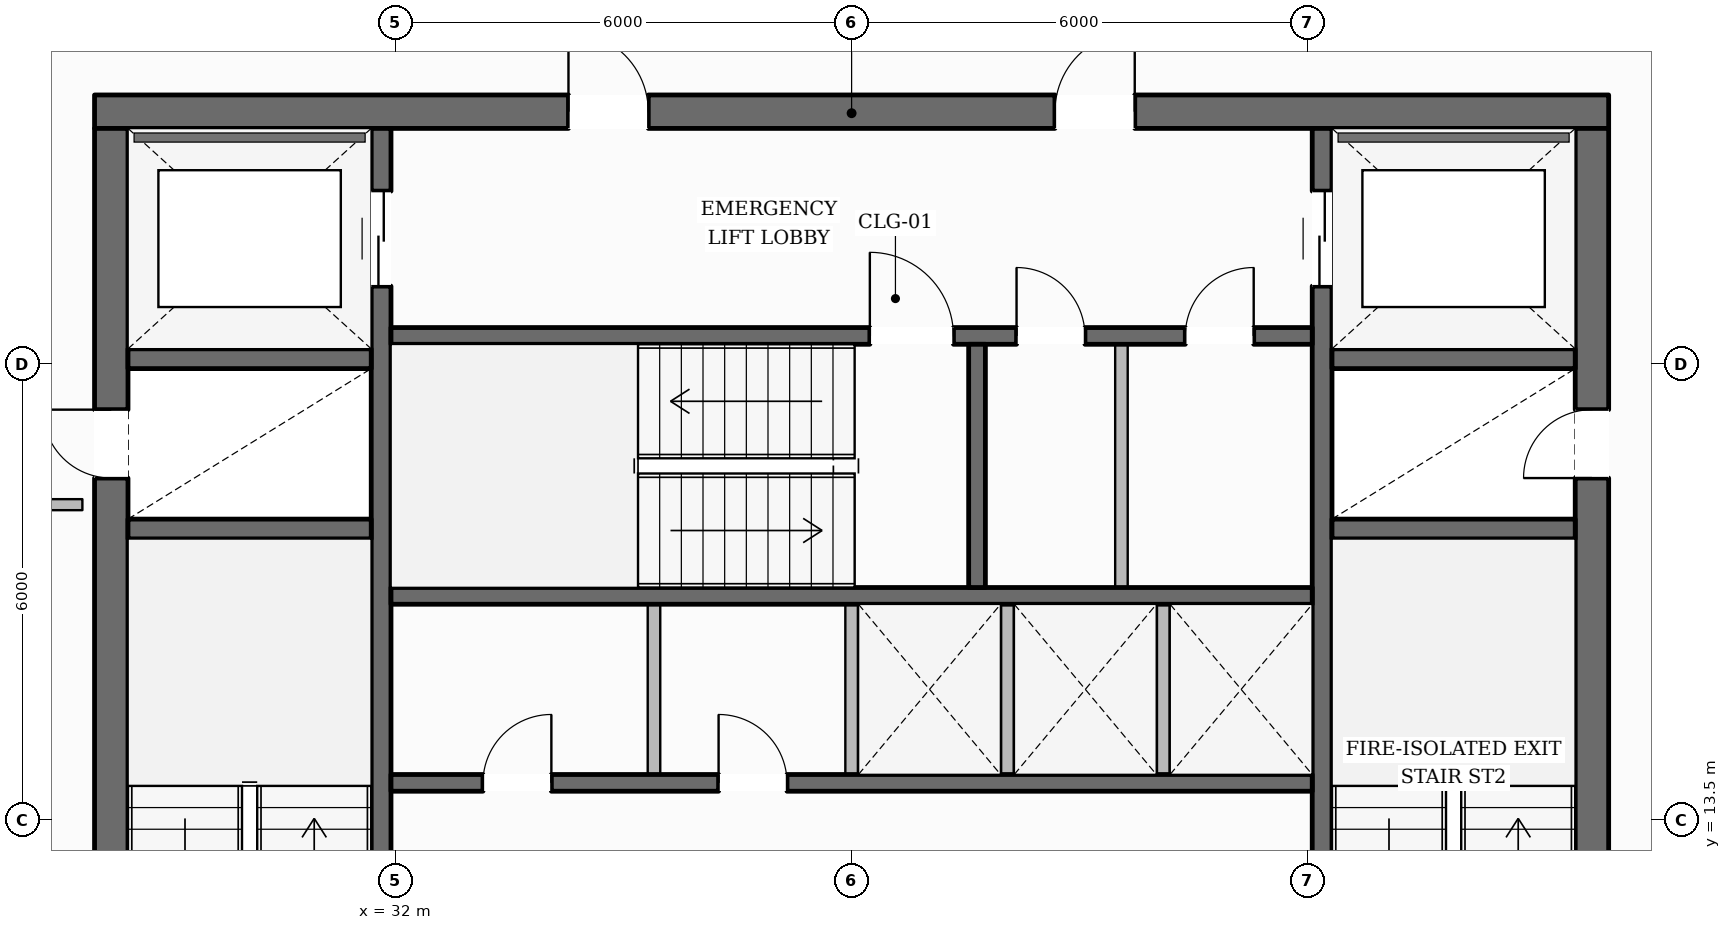
"""IFC4 building model, lengths in metres.
Left out: names, types, materials, properties, quantities, classifications, styles, units other than length and angle.
Written with IfcOpenShell. Run it as: python <this file> out.ifc"""

import sys

from ifc_helpers import new_model, si_unit, direction, frame, frame_2d, origin, place, context, subcontext, project, spatial, rectangle, extrude, element, fill, save


model = new_model("IFC4")
c1 = context("Model", 3, precision=1e-05, world=origin(), true_north=direction((0.0, 1.0)))
c2 = subcontext(c1, "Body", "Model", "MODEL_VIEW")
j1 = project(units=[si_unit("LENGTHUNIT", "METRE"), si_unit("PLANEANGLEUNIT", "RADIAN")], contexts=[c1])
p1 = place(None, origin())
s1 = spatial("IfcSite", under=j1, at=p1, CompositionType="ELEMENT")
p2 = place(p1, origin())
s2 = spatial("IfcBuilding", under=s1, at=p2, CompositionType="ELEMENT")
p3 = place(p2, frame((0.0, 0.0, 165.0)))
s3 = spatial("IfcBuildingStorey", under=s2, at=p3, CompositionType="ELEMENT", Elevation=165.0)
p4 = place(p3, frame((28.04, 22.82, 0.0), z_axis=(0.0, 0.0, 1.0), x_axis=(1.0, 0.0, 0.0)))
e1 = element("IfcWall", 1, at=p4, inside=s3, PredefinedType="SOLIDWALL", context=c2, shape_type="SweptSolid", body=[
    extrude(rectangle(XDim=19.92, YDim=0.44, at=frame_2d((9.96, 0.0))), origin(), (0.0, 0.0, 1.0), 3.6),
])
p5 = place(p4, frame((6.235, 0.0, 0.0)))
e2 = element("IfcOpeningElement", 2, at=p5, cuts=e1, PredefinedType="OPENING", context=c2, shape_type="SweptSolid", body=[
    extrude(rectangle(XDim=1.05, YDim=2.15, at=frame_2d((0.525, 1.075))), frame((0.0, 0.23, 0.0), z_axis=(0.0, -1.0, 0.0), x_axis=(1.0, 0.0, 0.0)), (0.0, 0.0, 1.0), 0.46),
])
p6 = place(p4, frame((12.635, 0.0, 0.0)))
e3 = element("IfcOpeningElement", 3, at=p6, cuts=e1, PredefinedType="OPENING", context=c2, shape_type="SweptSolid", body=[
    extrude(rectangle(XDim=1.05, YDim=2.15, at=frame_2d((0.525, 1.075))), frame((0.0, 0.23, 0.0), z_axis=(0.0, -1.0, 0.0), x_axis=(1.0, 0.0, 0.0)), (0.0, 0.0, 1.0), 0.46),
])
p7 = place(p3, frame((28.26, 9.6, 0.0), z_axis=(0.0, 0.0, 1.0), x_axis=(0.0, 1.0, 0.0)))
e4 = element("IfcWall", 4, at=p7, inside=s3, PredefinedType="SOLIDWALL", context=c2, shape_type="SweptSolid", body=[
    extrude(rectangle(XDim=13.0, YDim=0.44, at=frame_2d((6.5, 0.0))), origin(), (0.0, 0.0, 1.0), 3.6),
])
p8 = place(p7, frame((0.2, 0.0, 0.0)))
e5 = element("IfcOpeningElement", 5, at=p8, cuts=e4, PredefinedType="OPENING", context=c2, shape_type="SweptSolid", body=[
    extrude(rectangle(XDim=1.1, YDim=2.15, at=frame_2d((0.55, 1.075))), frame((0.0, 0.23, 0.0), z_axis=(0.0, -1.0, 0.0), x_axis=(1.0, 0.0, 0.0)), (0.0, 0.0, 1.0), 0.46),
])
p9 = place(p7, frame((8.4, 0.0, 0.0)))
e6 = element("IfcOpeningElement", 6, at=p9, cuts=e4, PredefinedType="OPENING", context=c2, shape_type="SweptSolid", body=[
    extrude(rectangle(XDim=0.9, YDim=2.1, at=frame_2d((0.45, 1.05))), frame((0.0, 0.23, 0.0), z_axis=(0.0, -1.0, 0.0), x_axis=(1.0, 0.0, 0.0)), (0.0, 0.0, 1.0), 0.46),
])
p10 = place(p3, frame((47.74, 9.6, 0.0), z_axis=(0.0, 0.0, 1.0), x_axis=(0.0, 1.0, 0.0)))
e7 = element("IfcWall", 7, at=p10, inside=s3, PredefinedType="SOLIDWALL", context=c2, shape_type="SweptSolid", body=[
    extrude(rectangle(XDim=13.0, YDim=0.44, at=frame_2d((6.5, 0.0))), origin(), (0.0, 0.0, 1.0), 3.6),
])
p11 = place(p10, frame((0.2, 0.0, 0.0)))
e8 = element("IfcOpeningElement", 8, at=p11, cuts=e7, PredefinedType="OPENING", context=c2, shape_type="SweptSolid", body=[
    extrude(rectangle(XDim=1.1, YDim=2.15, at=frame_2d((0.55, 1.075))), frame((0.0, 0.23, 0.0), z_axis=(0.0, -1.0, 0.0), x_axis=(1.0, 0.0, 0.0)), (0.0, 0.0, 1.0), 0.46),
])
p12 = place(p10, frame((8.4, 0.0, 0.0)))
e9 = element("IfcOpeningElement", 9, at=p12, cuts=e7, PredefinedType="OPENING", context=c2, shape_type="SweptSolid", body=[
    extrude(rectangle(XDim=0.9, YDim=2.1, at=frame_2d((0.45, 1.05))), frame((0.0, 0.23, 0.0), z_axis=(0.0, -1.0, 0.0), x_axis=(1.0, 0.0, 0.0)), (0.0, 0.0, 1.0), 0.46),
])
p13 = place(p3, frame((31.81, 9.6, 0.0), z_axis=(0.0, 0.0, 1.0), x_axis=(0.0, 1.0, 0.0)))
e10 = element("IfcWall", 10, at=p13, inside=s3, PredefinedType="SHEAR", context=c2, shape_type="SweptSolid", body=[
    extrude(rectangle(XDim=13.0, YDim=0.26, at=frame_2d((6.5, 0.0))), origin(), (0.0, 0.0, 1.0), 3.6),
])
p14 = place(p13, frame((10.925, 0.0, 0.0)))
e11 = element("IfcOpeningElement", 11, at=p14, cuts=e10, PredefinedType="OPENING", context=c2, shape_type="SweptSolid", body=[
    extrude(rectangle(XDim=1.25, YDim=2.25, at=frame_2d((0.625, 1.125))), frame((0.0, 0.14, 0.0), z_axis=(0.0, -1.0, 0.0), x_axis=(1.0, 0.0, 0.0)), (0.0, 0.0, 1.0), 0.28),
])
p15 = place(p3, frame((44.19, 9.6, 0.0), z_axis=(0.0, 0.0, 1.0), x_axis=(0.0, 1.0, 0.0)))
e12 = element("IfcWall", 12, at=p15, inside=s3, PredefinedType="SHEAR", context=c2, shape_type="SweptSolid", body=[
    extrude(rectangle(XDim=13.0, YDim=0.26, at=frame_2d((6.5, 0.0))), origin(), (0.0, 0.0, 1.0), 3.6),
])
p16 = place(p15, frame((10.925, 0.0, 0.0)))
e13 = element("IfcOpeningElement", 13, at=p16, cuts=e12, PredefinedType="OPENING", context=c2, shape_type="SweptSolid", body=[
    extrude(rectangle(XDim=1.25, YDim=2.25, at=frame_2d((0.625, 1.125))), frame((0.0, 0.14, 0.0), z_axis=(0.0, -1.0, 0.0), x_axis=(1.0, 0.0, 0.0)), (0.0, 0.0, 1.0), 0.28),
])
for number, where, z_axis, x_axis in (
    (14, (28.48, 17.33, 0.0), (0.0, 0.0, 1.0), (1.0, 0.0, 0.0)),
    (15, (28.48, 19.57, 0.0), (0.0, 0.0, 1.0), (1.0, 0.0, 0.0)),
    (16, (44.32, 17.33, 0.0), (0.0, 0.0, 1.0), (1.0, 0.0, 0.0)),
    (17, (44.32, 19.57, 0.0), (0.0, 0.0, 1.0), (1.0, 0.0, 0.0)),
):
    element("IfcWall", number, at=place(p3, frame(where, z_axis=z_axis, x_axis=x_axis)), inside=s3, PredefinedType="SHEAR", context=c2, shape_type="SweptSolid", body=[
        extrude(rectangle(XDim=3.2, YDim=0.26, at=frame_2d((1.6, 0.0))), origin(), (0.0, 0.0, 1.0), 3.6),
    ])
p17 = place(p3, frame((31.94, 19.87, 0.0), z_axis=(0.0, 0.0, 1.0), x_axis=(1.0, 0.0, 0.0)))
e18 = element("IfcWall", 18, at=p17, inside=s3, PredefinedType="SOLIDWALL", context=c2, shape_type="SweptSolid", body=[
    extrude(rectangle(XDim=12.12, YDim=0.22, at=frame_2d((6.06, 0.0))), origin(), (0.0, 0.0, 1.0), 3.6),
])
p18 = place(p17, frame((6.3, 0.0, 0.0)))
e19 = element("IfcOpeningElement", 19, at=p18, cuts=e18, PredefinedType="OPENING", context=c2, shape_type="SweptSolid", body=[
    extrude(rectangle(XDim=1.1, YDim=2.15, at=frame_2d((0.55, 1.075))), frame((0.0, 0.12, 0.0), z_axis=(0.0, -1.0, 0.0), x_axis=(1.0, 0.0, 0.0)), (0.0, 0.0, 1.0), 0.24),
])
p19 = place(p17, frame((8.23, 0.0, 0.0)))
e20 = element("IfcOpeningElement", 20, at=p19, cuts=e18, PredefinedType="OPENING", context=c2, shape_type="SweptSolid", body=[
    extrude(rectangle(XDim=0.9, YDim=2.1, at=frame_2d((0.45, 1.05))), frame((0.0, 0.12, 0.0), z_axis=(0.0, -1.0, 0.0), x_axis=(1.0, 0.0, 0.0)), (0.0, 0.0, 1.0), 0.24),
])
p20 = place(p17, frame((10.45, 0.0, 0.0)))
e21 = element("IfcOpeningElement", 21, at=p20, cuts=e18, PredefinedType="OPENING", context=c2, shape_type="SweptSolid", body=[
    extrude(rectangle(XDim=0.9, YDim=2.1, at=frame_2d((0.45, 1.05))), frame((0.0, 0.12, 0.0), z_axis=(0.0, -1.0, 0.0), x_axis=(1.0, 0.0, 0.0)), (0.0, 0.0, 1.0), 0.24),
])
p21 = place(p3, frame((31.94, 16.45, 0.0), z_axis=(0.0, 0.0, 1.0), x_axis=(1.0, 0.0, 0.0)))
e22 = element("IfcWall", 22, at=p21, inside=s3, PredefinedType="SOLIDWALL", context=c2, shape_type="SweptSolid", body=[
    extrude(rectangle(XDim=12.12, YDim=0.22, at=frame_2d((6.06, 0.0))), origin(), (0.0, 0.0, 1.0), 3.6),
])
p22 = place(p3, frame((39.65, 16.56, 0.0), z_axis=(0.0, 0.0, 1.0), x_axis=(0.0, 1.0, 0.0)))
e23 = element("IfcWall", 23, at=p22, inside=s3, PredefinedType="SOLIDWALL", context=c2, shape_type="SweptSolid", body=[
    extrude(rectangle(XDim=3.2, YDim=0.22, at=frame_2d((1.6, 0.0))), origin(), (0.0, 0.0, 1.0), 3.6),
])
p23 = place(p3, frame((31.94, 13.99, 0.0), z_axis=(0.0, 0.0, 1.0), x_axis=(1.0, 0.0, 0.0)))
e24 = element("IfcWall", 24, at=p23, inside=s3, PredefinedType="SOLIDWALL", context=c2, shape_type="SweptSolid", body=[
    extrude(rectangle(XDim=12.12, YDim=0.22, at=frame_2d((6.06, 0.0))), origin(), (0.0, 0.0, 1.0), 3.6),
])
p24 = place(p23, frame((1.21, 0.0, 0.0)))
e25 = element("IfcOpeningElement", 25, at=p24, cuts=e24, PredefinedType="OPENING", context=c2, shape_type="SweptSolid", body=[
    extrude(rectangle(XDim=0.9, YDim=2.1, at=frame_2d((0.45, 1.05))), frame((0.0, 0.12, 0.0), z_axis=(0.0, -1.0, 0.0), x_axis=(1.0, 0.0, 0.0)), (0.0, 0.0, 1.0), 0.24),
])
p25 = place(p23, frame((4.31, 0.0, 0.0)))
e26 = element("IfcOpeningElement", 26, at=p25, cuts=e24, PredefinedType="OPENING", context=c2, shape_type="SweptSolid", body=[
    extrude(rectangle(XDim=0.9, YDim=2.1, at=frame_2d((0.45, 1.05))), frame((0.0, 0.12, 0.0), z_axis=(0.0, -1.0, 0.0), x_axis=(1.0, 0.0, 0.0)), (0.0, 0.0, 1.0), 0.24),
])
p26 = place(p3, frame((14.964, 12.319, 0.0), z_axis=(0.0, 0.0, 1.0), x_axis=(0.493387150796, 0.869809817966, 0.0)))
e27 = element("IfcWall", 27, at=p26, inside=s3, PredefinedType="STANDARD", context=c2, shape_type="SweptSolid", body=[
    extrude(rectangle(XDim=37.096, YDim=0.35, at=frame_2d((18.548, 0.0))), origin(), (0.0, 0.0, 1.0), 3.132),
])
p27 = place(p26, frame((32.879, 0.0, 0.65)))
e28 = element("IfcOpeningElement", 28, at=p27, cuts=e27, PredefinedType="OPENING", context=c2, shape_type="SweptSolid", body=[
    extrude(rectangle(XDim=1.45, YDim=1.75, at=frame_2d((0.725, 0.875))), frame((0.0, 0.185, 0.0), z_axis=(0.0, -1.0, 0.0), x_axis=(1.0, 0.0, 0.0)), (0.0, 0.0, 1.0), 0.37),
])
p28 = place(p26, frame((26.855, 0.0, 0.65)))
e29 = element("IfcOpeningElement", 29, at=p28, cuts=e27, PredefinedType="OPENING", context=c2, shape_type="SweptSolid", body=[
    extrude(rectangle(XDim=1.45, YDim=1.75, at=frame_2d((0.725, 0.875))), frame((0.0, 0.185, 0.0), z_axis=(0.0, -1.0, 0.0), x_axis=(1.0, 0.0, 0.0)), (0.0, 0.0, 1.0), 0.37),
])
p29 = place(p26, frame((14.807, 0.0, 0.65)))
e30 = element("IfcOpeningElement", 30, at=p29, cuts=e27, PredefinedType="OPENING", context=c2, shape_type="SweptSolid", body=[
    extrude(rectangle(XDim=1.45, YDim=1.75, at=frame_2d((0.725, 0.875))), frame((0.0, 0.185, 0.0), z_axis=(0.0, -1.0, 0.0), x_axis=(1.0, 0.0, 0.0)), (0.0, 0.0, 1.0), 0.37),
])
p30 = place(p26, frame((8.783, 0.0, 0.65)))
e31 = element("IfcOpeningElement", 31, at=p30, cuts=e27, PredefinedType="OPENING", context=c2, shape_type="SweptSolid", body=[
    extrude(rectangle(XDim=1.45, YDim=1.75, at=frame_2d((0.725, 0.875))), frame((0.0, 0.185, 0.0), z_axis=(0.0, -1.0, 0.0), x_axis=(1.0, 0.0, 0.0)), (0.0, 0.0, 1.0), 0.37),
])
p31 = place(p26, frame((2.759, 0.0, 0.65)))
e32 = element("IfcOpeningElement", 32, at=p31, cuts=e27, PredefinedType="OPENING", context=c2, shape_type="SweptSolid", body=[
    extrude(rectangle(XDim=1.45, YDim=1.75, at=frame_2d((0.725, 0.875))), frame((0.0, 0.185, 0.0), z_axis=(0.0, -1.0, 0.0), x_axis=(1.0, 0.0, 0.0)), (0.0, 0.0, 1.0), 0.37),
])
p32 = place(p3, frame((42.733, 44.585, 0.0), z_axis=(0.0, 0.0, 1.0), x_axis=(0.493387150796, -0.869809817966, 0.0)))
e33 = element("IfcWall", 33, at=p32, inside=s3, PredefinedType="STANDARD", context=c2, shape_type="SweptSolid", body=[
    extrude(rectangle(XDim=37.096, YDim=0.35, at=frame_2d((18.548, 0.0))), origin(), (0.0, 0.0, 1.0), 3.132),
])
p33 = place(p32, frame((32.886, 0.0, 0.65)))
e34 = element("IfcOpeningElement", 34, at=p33, cuts=e33, PredefinedType="OPENING", context=c2, shape_type="SweptSolid", body=[
    extrude(rectangle(XDim=1.45, YDim=1.75, at=frame_2d((0.725, 0.875))), frame((0.0, 0.185, 0.0), z_axis=(0.0, -1.0, 0.0), x_axis=(1.0, 0.0, 0.0)), (0.0, 0.0, 1.0), 0.37),
])
p34 = place(p32, frame((26.863, 0.0, 0.65)))
e35 = element("IfcOpeningElement", 35, at=p34, cuts=e33, PredefinedType="OPENING", context=c2, shape_type="SweptSolid", body=[
    extrude(rectangle(XDim=1.45, YDim=1.75, at=frame_2d((0.725, 0.875))), frame((0.0, 0.185, 0.0), z_axis=(0.0, -1.0, 0.0), x_axis=(1.0, 0.0, 0.0)), (0.0, 0.0, 1.0), 0.37),
])
p35 = place(p32, frame((14.814, 0.0, 0.65)))
e36 = element("IfcOpeningElement", 36, at=p35, cuts=e33, PredefinedType="OPENING", context=c2, shape_type="SweptSolid", body=[
    extrude(rectangle(XDim=1.45, YDim=1.75, at=frame_2d((0.725, 0.875))), frame((0.0, 0.185, 0.0), z_axis=(0.0, -1.0, 0.0), x_axis=(1.0, 0.0, 0.0)), (0.0, 0.0, 1.0), 0.37),
])
p36 = place(p32, frame((8.791, 0.0, 0.65)))
e37 = element("IfcOpeningElement", 37, at=p36, cuts=e33, PredefinedType="OPENING", context=c2, shape_type="SweptSolid", body=[
    extrude(rectangle(XDim=1.45, YDim=1.75, at=frame_2d((0.725, 0.875))), frame((0.0, 0.185, 0.0), z_axis=(0.0, -1.0, 0.0), x_axis=(1.0, 0.0, 0.0)), (0.0, 0.0, 1.0), 0.37),
])
p37 = place(p32, frame((2.767, 0.0, 0.65)))
e38 = element("IfcOpeningElement", 38, at=p37, cuts=e33, PredefinedType="OPENING", context=c2, shape_type="SweptSolid", body=[
    extrude(rectangle(XDim=1.45, YDim=1.75, at=frame_2d((0.725, 0.875))), frame((0.0, 0.185, 0.0), z_axis=(0.0, -1.0, 0.0), x_axis=(1.0, 0.0, 0.0)), (0.0, 0.0, 1.0), 0.37),
])
for number, where, z_axis, x_axis in (
    (39, (38.0, 14.1, 0.0), (0.0, 0.0, 1.0), (0.0, 1.0, 0.0)),
    (40, (35.4, 14.1, 0.0), (0.0, 0.0, 1.0), (0.0, 1.0, 0.0)),
    (41, (40.05, 14.1, 0.0), (0.0, 0.0, 1.0), (0.0, 1.0, 0.0)),
    (42, (42.1, 14.1, 0.0), (0.0, 0.0, 1.0), (0.0, 1.0, 0.0)),
):
    element("IfcWall", number, at=place(p3, frame(where, z_axis=z_axis, x_axis=x_axis)), inside=s3, PredefinedType="PARTITIONING", context=c2, shape_type="SweptSolid", body=[
        extrude(rectangle(XDim=2.24, YDim=0.165, at=frame_2d((1.12, 0.0))), origin(), (0.0, 0.0, 1.0), 3.6),
    ])
p38 = place(p3, frame((41.55, 16.56, 0.0), z_axis=(0.0, 0.0, 1.0), x_axis=(0.0, 1.0, 0.0)))
e43 = element("IfcWall", 43, at=p38, inside=s3, PredefinedType="PARTITIONING", context=c2, shape_type="SweptSolid", body=[
    extrude(rectangle(XDim=3.2, YDim=0.165, at=frame_2d((1.6, 0.0))), origin(), (0.0, 0.0, 1.0), 3.6),
])
p39 = place(p3, frame((27.88, 17.65, 0.0), z_axis=(0.0, 0.0, 1.0), x_axis=(-1.0, 0.0, 0.0)))
e44 = element("IfcWall", 44, at=p39, inside=s3, PredefinedType="PARTITIONING", context=c2, shape_type="SweptSolid", body=[
    extrude(rectangle(XDim=1.82, YDim=0.145, at=frame_2d((0.91, 0.0))), origin(), (0.0, 0.0, 1.0), 3.6),
])
p40 = place(p3, frame((53.807, 22.75, 0.0), z_axis=(0.0, 0.0, 1.0), x_axis=(-0.664519515039, 0.747270910803, 0.0)))
e45 = element("IfcWall", 45, at=p40, inside=s3, PredefinedType="PARTITIONING", context=c2, shape_type="SweptSolid", body=[
    extrude(rectangle(XDim=10.123, YDim=0.125, at=frame_2d((5.061, 0.0))), origin(), (0.0, 0.0, 1.0), 3.339),
])
p41 = place(p40, frame((4.547, 0.0, 0.0)))
e46 = element("IfcOpeningElement", 46, at=p41, cuts=e45, PredefinedType="OPENING", context=c2, shape_type="SweptSolid", body=[
    extrude(rectangle(XDim=1.02, YDim=2.15, at=frame_2d((0.51, 1.075))), frame((0.0, 0.073, 0.0), z_axis=(0.0, -1.0, 0.0), x_axis=(1.0, 0.0, 0.0)), (0.0, 0.0, 1.0), 0.145),
])
p42 = place(p18, origin())
e47 = element("IfcDoor", 47, at=p42, inside=s3, OperationType="SINGLE_SWING_LEFT", PredefinedType="DOOR", context=c2, shape_type="SweptSolid", body=[
    extrude(rectangle(XDim=1.1, YDim=2.15, at=frame_2d((0.55, 1.075))), frame((0.0, 0.025, 0.0), z_axis=(0.0, -1.0, 0.0), x_axis=(1.0, 0.0, 0.0)), (0.0, 0.0, 1.0), 0.05),
])
fill(e19, e47)
p43 = place(p9, origin())
e48 = element("IfcDoor", 48, at=p43, inside=s3, OperationType="SINGLE_SWING_RIGHT", PredefinedType="DOOR", context=c2, shape_type="SweptSolid", body=[
    extrude(rectangle(XDim=0.9, YDim=2.1, at=frame_2d((0.45, 1.05))), frame((0.0, 0.025, 0.0), z_axis=(0.0, -1.0, 0.0), x_axis=(1.0, 0.0, 0.0)), (0.0, 0.0, 1.0), 0.05),
])
fill(e6, e48)
p44 = place(p12, origin())
e49 = element("IfcDoor", 49, at=p44, inside=s3, OperationType="SINGLE_SWING_LEFT", PredefinedType="DOOR", context=c2, shape_type="SweptSolid", body=[
    extrude(rectangle(XDim=0.9, YDim=2.1, at=frame_2d((0.45, 1.05))), frame((0.0, 0.025, 0.0), z_axis=(0.0, -1.0, 0.0), x_axis=(1.0, 0.0, 0.0)), (0.0, 0.0, 1.0), 0.05),
])
fill(e9, e49)
p45 = place(p5, origin())
e50 = element("IfcDoor", 50, at=p45, inside=s3, OperationType="SINGLE_SWING_LEFT", PredefinedType="DOOR", context=c2, shape_type="SweptSolid", body=[
    extrude(rectangle(XDim=1.05, YDim=2.15, at=frame_2d((0.525, 1.075))), frame((0.0, 0.025, 0.0), z_axis=(0.0, -1.0, 0.0), x_axis=(1.0, 0.0, 0.0)), (0.0, 0.0, 1.0), 0.05),
])
fill(e2, e50)
p46 = place(p6, origin())
e51 = element("IfcDoor", 51, at=p46, inside=s3, OperationType="SINGLE_SWING_RIGHT", PredefinedType="DOOR", context=c2, shape_type="SweptSolid", body=[
    extrude(rectangle(XDim=1.05, YDim=2.15, at=frame_2d((0.525, 1.075))), frame((0.0, 0.025, 0.0), z_axis=(0.0, -1.0, 0.0), x_axis=(1.0, 0.0, 0.0)), (0.0, 0.0, 1.0), 0.05),
])
fill(e3, e51)
p47 = place(p14, origin())
e52 = element("IfcDoor", 52, at=p47, inside=s3, OperationType="DOUBLE_DOOR_SLIDING", PredefinedType="DOOR", context=c2, shape_type="SweptSolid", body=[
    extrude(rectangle(XDim=1.25, YDim=2.25, at=frame_2d((0.625, 1.125))), frame((0.0, 0.025, 0.0), z_axis=(0.0, -1.0, 0.0), x_axis=(1.0, 0.0, 0.0)), (0.0, 0.0, 1.0), 0.05),
])
fill(e11, e52)
p48 = place(p16, origin())
e53 = element("IfcDoor", 53, at=p48, inside=s3, OperationType="DOUBLE_DOOR_SLIDING", PredefinedType="DOOR", context=c2, shape_type="SweptSolid", body=[
    extrude(rectangle(XDim=1.25, YDim=2.25, at=frame_2d((0.625, 1.125))), frame((0.0, 0.025, 0.0), z_axis=(0.0, -1.0, 0.0), x_axis=(1.0, 0.0, 0.0)), (0.0, 0.0, 1.0), 0.05),
])
fill(e13, e53)
p49 = place(p24, origin())
e54 = element("IfcDoor", 54, at=p49, inside=s3, OperationType="SINGLE_SWING_RIGHT", PredefinedType="DOOR", context=c2, shape_type="SweptSolid", body=[
    extrude(rectangle(XDim=0.9, YDim=2.1, at=frame_2d((0.45, 1.05))), frame((0.0, 0.025, 0.0), z_axis=(0.0, -1.0, 0.0), x_axis=(1.0, 0.0, 0.0)), (0.0, 0.0, 1.0), 0.05),
])
fill(e25, e54)
p50 = place(p25, origin())
e55 = element("IfcDoor", 55, at=p50, inside=s3, OperationType="SINGLE_SWING_LEFT", PredefinedType="DOOR", context=c2, shape_type="SweptSolid", body=[
    extrude(rectangle(XDim=0.9, YDim=2.1, at=frame_2d((0.45, 1.05))), frame((0.0, 0.025, 0.0), z_axis=(0.0, -1.0, 0.0), x_axis=(1.0, 0.0, 0.0)), (0.0, 0.0, 1.0), 0.05),
])
fill(e26, e55)
p51 = place(p19, origin())
e56 = element("IfcDoor", 56, at=p51, inside=s3, OperationType="SINGLE_SWING_LEFT", PredefinedType="DOOR", context=c2, shape_type="SweptSolid", body=[
    extrude(rectangle(XDim=0.9, YDim=2.1, at=frame_2d((0.45, 1.05))), frame((0.0, 0.025, 0.0), z_axis=(0.0, -1.0, 0.0), x_axis=(1.0, 0.0, 0.0)), (0.0, 0.0, 1.0), 0.05),
])
fill(e20, e56)
p52 = place(p20, origin())
e57 = element("IfcDoor", 57, at=p52, inside=s3, OperationType="SINGLE_SWING_RIGHT", PredefinedType="DOOR", context=c2, shape_type="SweptSolid", body=[
    extrude(rectangle(XDim=0.9, YDim=2.1, at=frame_2d((0.45, 1.05))), frame((0.0, 0.025, 0.0), z_axis=(0.0, -1.0, 0.0), x_axis=(1.0, 0.0, 0.0)), (0.0, 0.0, 1.0), 0.05),
])
fill(e21, e57)
save(model, sys.argv[1])
